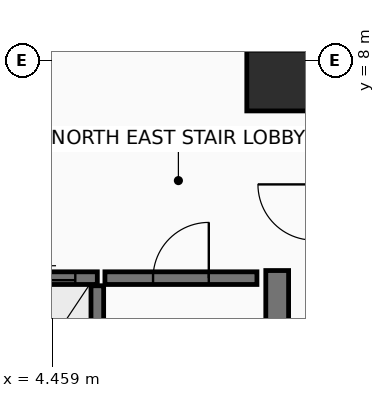
"""IFC4 building model, lengths in metres.
Left out: names, types, materials, properties, quantities, classifications, styles, units other than length and angle.
Written with IfcOpenShell. Run it as: python <this file> out.ifc"""

import sys

from ifc_helpers import new_model, si_unit, direction, frame, frame_2d, origin, origin_2d, place, context, subcontext, project, spatial, rectangle, extrude, element, fill, save


model = new_model("IFC4")
c1 = context("Model", 3, precision=1e-05, world=origin(), true_north=direction((0.0, 1.0)))
c2 = subcontext(c1, "Body", "Model", "MODEL_VIEW")
j1 = project(units=[si_unit("LENGTHUNIT", "METRE"), si_unit("PLANEANGLEUNIT", "RADIAN")], contexts=[c1])
p1 = place(None, origin())
s1 = spatial("IfcSite", under=j1, at=p1, CompositionType="ELEMENT")
p2 = place(p1, origin())
s2 = spatial("IfcBuilding", under=s1, at=p2, CompositionType="ELEMENT")
p3 = place(p2, frame((0.0, 0.0, 112.45)))
s3 = spatial("IfcBuildingStorey", under=s2, at=p3, CompositionType="ELEMENT", Elevation=112.45)
p4 = place(p3, frame((8.9, 7.6, 0.0), z_axis=(0.0, 0.0, 1.0), x_axis=(1.0, 0.0, 0.0)))
e1 = element("IfcColumn", 1, at=p4, inside=s3, PredefinedType="COLUMN", context=c2, shape_type="SweptSolid", body=[
    extrude(rectangle(XDim=1.2, YDim=1.2, at=origin_2d()), origin(), (0.0, 0.0, 1.0), 3.6),
])
p5 = place(p3, frame((8.9, -6.85, 0.0), z_axis=(0.0, 0.0, 1.0), x_axis=(0.0, 1.0, 0.0)))
e2 = element("IfcWall", 2, at=p5, inside=s3, PredefinedType="SHEAR", context=c2, shape_type="SweptSolid", body=[
    extrude(rectangle(XDim=10.7, YDim=0.45, at=frame_2d((5.35, 0.0))), origin(), (0.0, 0.0, 1.0), 3.41),
])
p6 = place(p3, frame((5.35, -3.75, 0.0), z_axis=(0.0, 0.0, 1.0), x_axis=(0.0, 1.0, 0.0)))
e3 = element("IfcWall", 3, at=p6, inside=s3, PredefinedType="SHEAR", context=c2, shape_type="SweptSolid", body=[
    extrude(rectangle(XDim=7.3, YDim=0.25, at=frame_2d((3.65, 0.0))), origin(), (0.0, 0.0, 1.0), 3.41),
])
p7 = place(p3, frame((5.5, 3.7, 0.0), z_axis=(0.0, 0.0, 1.0), x_axis=(1.0, 0.0, 0.0)))
e4 = element("IfcWall", 4, at=p7, inside=s3, PredefinedType="SHEAR", context=c2, shape_type="SweptSolid", body=[
    extrude(rectangle(XDim=3.0, YDim=0.25, at=frame_2d((1.5, 0.0))), origin(), (0.0, 0.0, 1.0), 3.41),
])
p8 = place(p7, frame((0.95, 0.0, 0.0)))
e5 = element("IfcOpeningElement", 5, at=p8, cuts=e4, PredefinedType="OPENING", context=c2, shape_type="SweptSolid", body=[
    extrude(rectangle(XDim=1.1, YDim=2.15, at=frame_2d((0.55, 1.075))), frame((0.0, 0.135, 0.0), z_axis=(0.0, -1.0, 0.0), x_axis=(1.0, 0.0, 0.0)), (0.0, 0.0, 1.0), 0.27),
])
p9 = place(p3, frame((3.28, 3.7, 0.0), z_axis=(0.0, 0.0, 1.0), x_axis=(1.0, 0.0, 0.0)))
e6 = element("IfcWall", 6, at=p9, inside=s3, PredefinedType="SHEAR", context=c2, shape_type="SweptSolid", body=[
    extrude(rectangle(XDim=2.07, YDim=0.25, at=frame_2d((1.035, 0.0))), origin(), (0.0, 0.0, 1.0), 3.41),
])
p10 = place(p9, frame((0.435, 0.0, 0.0)))
e7 = element("IfcOpeningElement", 7, at=p10, cuts=e6, PredefinedType="OPENING", context=c2, shape_type="SweptSolid", body=[
    extrude(rectangle(XDim=1.2, YDim=2.2, at=frame_2d((0.6, 1.1))), frame((0.0, 0.135, 0.0), z_axis=(0.0, -1.0, 0.0), x_axis=(1.0, 0.0, 0.0)), (0.0, 0.0, 1.0), 0.27),
])
p11 = place(p8, frame((1.1, 0.0, 0.0), z_axis=(0.0, 0.0, 1.0), x_axis=(-1.0, 0.0, 0.0)))
e8 = element("IfcDoor", 8, at=p11, inside=s3, OperationType="SINGLE_SWING_LEFT", PredefinedType="DOOR", context=c2, shape_type="SweptSolid", body=[
    extrude(rectangle(XDim=1.1, YDim=2.15, at=frame_2d((0.55, 1.075))), frame((0.0, 0.025, 0.0), z_axis=(0.0, -1.0, 0.0), x_axis=(1.0, 0.0, 0.0)), (0.0, 0.0, 1.0), 0.05),
])
fill(e5, e8)
p12 = place(p10, origin())
e9 = element("IfcDoor", 9, at=p12, inside=s3, OperationType="SLIDING_TO_RIGHT", PredefinedType="DOOR", context=c2, shape_type="SweptSolid", body=[
    extrude(rectangle(XDim=1.2, YDim=2.2, at=frame_2d((0.6, 1.1))), frame((0.0, 0.025, 0.0), z_axis=(0.0, -1.0, 0.0), x_axis=(1.0, 0.0, 0.0)), (0.0, 0.0, 1.0), 0.05),
])
fill(e7, e9)
save(model, sys.argv[1])
